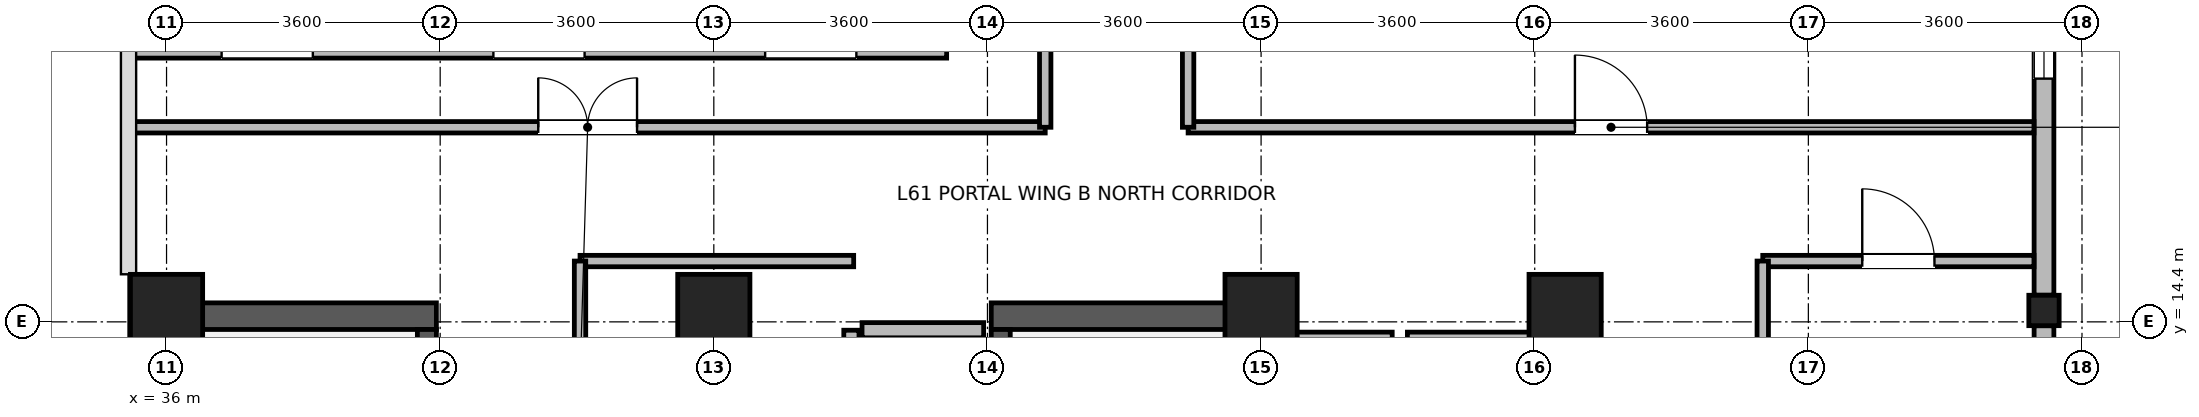
"""IFC4 building model, lengths in metres.
Left out: names, types, materials, properties, quantities, classifications, styles, units other than length and angle.
Written with IfcOpenShell. Run it as: python <this file> out.ifc"""

import sys

from ifc_helpers import new_model, si_unit, direction, frame, frame_2d, origin, origin_2d, place, context, subcontext, project, spatial, rectangle, i_section, extrude, source, transform, mapped, element, fill, save


model = new_model("IFC4")
c1 = context("Model", 3, precision=1e-05, world=origin(), true_north=direction((0.0, 1.0)))
c2 = subcontext(c1, "Body", "Model", "MODEL_VIEW")
j1 = project(units=[si_unit("LENGTHUNIT", "METRE"), si_unit("PLANEANGLEUNIT", "RADIAN")], contexts=[c1])
p1 = place(None, origin())
s1 = spatial("IfcSite", under=j1, at=p1, CompositionType="ELEMENT")
p2 = place(p1, origin())
s2 = spatial("IfcBuilding", under=s1, at=p2, CompositionType="ELEMENT")
p3 = place(p2, frame((0.0, 0.0, 238.8)))
s3 = spatial("IfcBuildingStorey", under=s2, at=p3, CompositionType="ELEMENT", Elevation=238.8)
for number, where, z_axis, x_axis in (
    (1, (36.175, 6.95, 0.0), (0.0, 0.0, 1.0), (0.0, 1.0, 0.0)),
    (2, (50.225, 6.95, 0.0), (0.0, 0.0, 1.0), (0.0, 1.0, 0.0)),
):
    element("IfcWall", number, at=place(p3, frame(where, z_axis=z_axis, x_axis=x_axis)), inside=s3, PredefinedType="SHEAR", context=c2, shape_type="SweptSolid", body=[
        extrude(rectangle(XDim=7.7, YDim=0.35, at=frame_2d((3.85, 0.0))), origin(), (0.0, 0.0, 1.0), 3.44),
    ])
for number, where, z_axis, x_axis in (
    (3, (36.35, 14.475, 0.0), (0.0, 0.0, 1.0), (1.0, 0.0, 0.0)),
    (4, (46.85, 14.475, 0.0), (0.0, 0.0, 1.0), (1.0, 0.0, 0.0)),
):
    element("IfcWall", number, at=place(p3, frame(where, z_axis=z_axis, x_axis=x_axis)), inside=s3, PredefinedType="SHEAR", context=c2, shape_type="SweptSolid", body=[
        extrude(rectangle(XDim=3.2, YDim=0.35, at=frame_2d((1.6, 0.0))), origin(), (0.0, 0.0, 1.0), 3.44),
    ])
p4 = place(p3, frame((39.425, 7.3, 0.0), z_axis=(0.0, 0.0, 1.0), x_axis=(0.0, 1.0, 0.0)))
e5 = element("IfcWall", 5, at=p4, inside=s3, PredefinedType="SHEAR", context=c2, shape_type="SweptSolid", body=[
    extrude(rectangle(XDim=7.0, YDim=0.25, at=frame_2d((3.5, 0.0))), origin(), (0.0, 0.0, 1.0), 3.44),
])
p5 = place(p4, frame((0.15, 0.0, 0.0)))
e6 = element("IfcOpeningElement", 6, at=p5, cuts=e5, PredefinedType="OPENING", context=c2, shape_type="SweptSolid", body=[
    extrude(rectangle(XDim=1.1, YDim=2.08, at=frame_2d((0.55, 1.04))), frame((0.0, 0.135, 0.0), z_axis=(0.0, -1.0, 0.0), x_axis=(1.0, 0.0, 0.0)), (0.0, 0.0, 1.0), 0.27),
])
p6 = place(p3, frame((46.975, 7.3, 0.0), z_axis=(0.0, 0.0, 1.0), x_axis=(0.0, 1.0, 0.0)))
e7 = element("IfcWall", 7, at=p6, inside=s3, PredefinedType="SHEAR", context=c2, shape_type="SweptSolid", body=[
    extrude(rectangle(XDim=7.0, YDim=0.25, at=frame_2d((3.5, 0.0))), origin(), (0.0, 0.0, 1.0), 3.44),
])
p7 = place(p6, frame((0.15, 0.0, 0.0)))
e8 = element("IfcOpeningElement", 8, at=p7, cuts=e7, PredefinedType="OPENING", context=c2, shape_type="SweptSolid", body=[
    extrude(rectangle(XDim=1.1, YDim=2.08, at=frame_2d((0.55, 1.04))), frame((0.0, 0.135, 0.0), z_axis=(0.0, -1.0, 0.0), x_axis=(1.0, 0.0, 0.0)), (0.0, 0.0, 1.0), 0.27),
])
m1 = source(origin(), c2, "Body", "SweptSolid", [
    extrude(rectangle(XDim=0.95, YDim=0.95, at=origin_2d()), origin(), (0.0, 0.0, 1.0), 3.7),
])
for number, where, z_axis, x_axis in (
    (9, (36.0, 14.55, 0.0), (0.0, 0.0, 1.0), (1.0, 0.0, 0.0)),
    (10, (43.2, 14.55, 0.0), (0.0, 0.0, 1.0), (1.0, 0.0, 0.0)),
    (11, (50.4, 14.55, 0.0), (0.0, 0.0, 1.0), (1.0, 0.0, 0.0)),
    (12, (54.4, 14.55, 0.0), (0.0, 0.0, 1.0), (1.0, 0.0, 0.0)),
):
    element("IfcColumn", number, at=place(p3, frame(where, z_axis=z_axis, x_axis=x_axis)), inside=s3, PredefinedType="COLUMN", context=c2, shape_type="MappedRepresentation", body=[
        mapped(m1, transform((0.0, 0.0, 0.0), x_axis=(1.0, 0.0, 0.0), y_axis=(0.0, 1.0, 0.0), z_axis=(0.0, 0.0, 1.0), scale=1.0)),
    ])
m2 = source(origin(), c2, "Body", "SweptSolid", [
    extrude(i_section(OverallWidth=0.399, OverallDepth=0.4, WebThickness=0.017, FlangeThickness=0.023, FilletRadius=0.015, at=origin_2d()), origin(), (0.0, 0.0, 1.0), 3.7),
])
p8 = place(p3, frame((60.7, 14.55, 0.0), z_axis=(0.0, 0.0, 1.0), x_axis=(1.0, 0.0, 0.0)))
e13 = element("IfcColumn", 13, at=p8, inside=s3, PredefinedType="COLUMN", context=c2, shape_type="MappedRepresentation", body=[
    mapped(m2, transform((0.0, 0.0, 0.0), x_axis=(1.0, 0.0, 0.0), y_axis=(0.0, 1.0, 0.0), z_axis=(0.0, 0.0, 1.0), scale=1.0)),
])
p9 = place(p3, frame((60.7, 14.349, 0.0), z_axis=(0.0, 0.0, 1.0), x_axis=(0.0, -1.0, 0.0)))
e14 = element("IfcWall", 14, at=p9, inside=s3, PredefinedType="STANDARD", context=c2, shape_type="SweptSolid", body=[
    extrude(rectangle(XDim=7.098, YDim=0.26, at=frame_2d((3.549, 0.0))), origin(), (0.0, 0.0, 1.0), 3.02),
])
p10 = place(p9, frame((1.175, 0.0, 0.85)))
e15 = element("IfcOpeningElement", 15, at=p10, cuts=e14, PredefinedType="OPENING", context=c2, shape_type="SweptSolid", body=[
    extrude(rectangle(XDim=1.2, YDim=1.75, at=frame_2d((0.6, 0.875))), frame((0.0, 0.14, 0.0), z_axis=(0.0, -1.0, 0.0), x_axis=(1.0, 0.0, 0.0)), (0.0, 0.0, 1.0), 0.28),
])
p11 = place(p9, frame((3.074, 0.0, 0.85)))
e16 = element("IfcOpeningElement", 16, at=p11, cuts=e14, PredefinedType="OPENING", context=c2, shape_type="SweptSolid", body=[
    extrude(rectangle(XDim=0.95, YDim=1.75, at=frame_2d((0.475, 0.875))), frame((0.0, 0.14, 0.0), z_axis=(0.0, -1.0, 0.0), x_axis=(1.0, 0.0, 0.0)), (0.0, 0.0, 1.0), 0.28),
])
p12 = place(p3, frame((60.7, 21.399, 0.0), z_axis=(0.0, 0.0, 1.0), x_axis=(0.0, -1.0, 0.0)))
e17 = element("IfcWall", 17, at=p12, inside=s3, PredefinedType="STANDARD", context=c2, shape_type="SweptSolid", body=[
    extrude(rectangle(XDim=6.648, YDim=0.26, at=frame_2d((3.324, 0.0))), origin(), (0.0, 0.0, 1.0), 3.02),
])
p13 = place(p12, frame((1.062, 0.0, 0.85)))
e18 = element("IfcOpeningElement", 18, at=p13, cuts=e17, PredefinedType="OPENING", context=c2, shape_type="SweptSolid", body=[
    extrude(rectangle(XDim=1.2, YDim=1.75, at=frame_2d((0.6, 0.875))), frame((0.0, 0.14, 0.0), z_axis=(0.0, -1.0, 0.0), x_axis=(1.0, 0.0, 0.0)), (0.0, 0.0, 1.0), 0.28),
])
p14 = place(p12, frame((2.849, 0.0, 0.85)))
e19 = element("IfcOpeningElement", 19, at=p14, cuts=e17, PredefinedType="OPENING", context=c2, shape_type="SweptSolid", body=[
    extrude(rectangle(XDim=0.95, YDim=1.75, at=frame_2d((0.475, 0.875))), frame((0.0, 0.14, 0.0), z_axis=(0.0, -1.0, 0.0), x_axis=(1.0, 0.0, 0.0)), (0.0, 0.0, 1.0), 0.28),
])
p15 = place(p3, frame((35.537, 18.0, 0.0), z_axis=(0.0, 0.0, 1.0), x_axis=(1.0, 0.0, 0.0)))
e20 = element("IfcWall", 20, at=p15, inside=s3, PredefinedType="STANDARD", context=c2, shape_type="SweptSolid", body=[
    extrude(rectangle(XDim=10.726, YDim=0.26, at=frame_2d((5.363, 0.0))), origin(), (0.0, 0.0, 1.0), 3.42),
])
p16 = place(p15, frame((1.188, 0.0, 0.85)))
e21 = element("IfcOpeningElement", 21, at=p16, cuts=e20, PredefinedType="OPENING", context=c2, shape_type="SweptSolid", body=[
    extrude(rectangle(XDim=1.2, YDim=1.75, at=frame_2d((0.6, 0.875))), frame((0.0, 0.14, 0.0), z_axis=(0.0, -1.0, 0.0), x_axis=(1.0, 0.0, 0.0)), (0.0, 0.0, 1.0), 0.28),
])
p17 = place(p15, frame((4.763, 0.0, 0.85)))
e22 = element("IfcOpeningElement", 22, at=p17, cuts=e20, PredefinedType="OPENING", context=c2, shape_type="SweptSolid", body=[
    extrude(rectangle(XDim=1.2, YDim=1.75, at=frame_2d((0.6, 0.875))), frame((0.0, 0.14, 0.0), z_axis=(0.0, -1.0, 0.0), x_axis=(1.0, 0.0, 0.0)), (0.0, 0.0, 1.0), 0.28),
])
p18 = place(p15, frame((8.338, 0.0, 0.85)))
e23 = element("IfcOpeningElement", 23, at=p18, cuts=e20, PredefinedType="OPENING", context=c2, shape_type="SweptSolid", body=[
    extrude(rectangle(XDim=1.2, YDim=1.75, at=frame_2d((0.6, 0.875))), frame((0.0, 0.14, 0.0), z_axis=(0.0, -1.0, 0.0), x_axis=(1.0, 0.0, 0.0)), (0.0, 0.0, 1.0), 0.28),
])
p19 = place(p3, frame((50.475, 14.165, 0.0), z_axis=(0.0, 0.0, 1.0), x_axis=(1.0, 0.0, 0.0)))
e24 = element("IfcWall", 24, at=p19, inside=s3, PredefinedType="PARTITIONING", context=c2, shape_type="SweptSolid", body=[
    extrude(rectangle(XDim=1.65, YDim=0.2, at=frame_2d((0.825, 0.0))), origin(), (0.0, 0.0, 1.0), 3.42),
])
p20 = place(p3, frame((52.325, 14.165, 0.0), z_axis=(0.0, 0.0, 1.0), x_axis=(1.0, 0.0, 0.0)))
e25 = element("IfcWall", 25, at=p20, inside=s3, PredefinedType="PARTITIONING", context=c2, shape_type="SweptSolid", body=[
    extrude(rectangle(XDim=1.65, YDim=0.2, at=frame_2d((0.825, 0.0))), origin(), (0.0, 0.0, 1.0), 3.42),
])
p21 = place(p3, frame((45.15, 14.29, 0.0), z_axis=(0.0, 0.0, 1.0), x_axis=(1.0, 0.0, 0.0)))
e26 = element("IfcWall", 26, at=p21, inside=s3, PredefinedType="PARTITIONING", context=c2, shape_type="SweptSolid", body=[
    extrude(rectangle(XDim=1.6, YDim=0.2, at=frame_2d((0.8, 0.0))), origin(), (0.0, 0.0, 1.0), 2.52),
])
p22 = place(p3, frame((45.01, 11.61, 0.0), z_axis=(0.0, 0.0, 1.0), x_axis=(0.0, 1.0, 0.0)))
e27 = element("IfcWall", 27, at=p22, inside=s3, PredefinedType="PARTITIONING", context=c2, shape_type="SweptSolid", body=[
    extrude(rectangle(XDim=2.68, YDim=0.2, at=frame_2d((1.34, 0.0))), origin(), (0.0, 0.0, 1.0), 3.42),
])
p23 = place(p3, frame((35.52, 16.96, 0.0), z_axis=(0.0, 0.0, 1.0), x_axis=(1.0, 0.0, 0.0)))
e28 = element("IfcWall", 28, at=p23, inside=s3, PredefinedType="PARTITIONING", context=c2, shape_type="SweptSolid", body=[
    extrude(rectangle(XDim=12.04, YDim=0.15, at=frame_2d((6.02, 0.0))), origin(), (0.0, 0.0, 1.0), 3.42),
])
p24 = place(p23, frame((5.37, 0.0, 0.0)))
e29 = element("IfcOpeningElement", 29, at=p24, cuts=e28, PredefinedType="OPENING", context=c2, shape_type="SweptSolid", body=[
    extrude(rectangle(XDim=1.3, YDim=2.12, at=frame_2d((0.65, 1.06))), frame((0.0, 0.085, 0.0), z_axis=(0.0, -1.0, 0.0), x_axis=(1.0, 0.0, 0.0)), (0.0, 0.0, 1.0), 0.17),
])
p25 = place(p3, frame((49.44, 16.96, 0.0), z_axis=(0.0, 0.0, 1.0), x_axis=(1.0, 0.0, 0.0)))
e30 = element("IfcWall", 30, at=p25, inside=s3, PredefinedType="PARTITIONING", context=c2, shape_type="SweptSolid", body=[
    extrude(rectangle(XDim=11.128, YDim=0.15, at=frame_2d((5.564, 0.0))), origin(), (0.0, 0.0, 1.0), 3.42),
])
p26 = place(p25, frame((5.089, 0.0, 0.0)))
e31 = element("IfcOpeningElement", 31, at=p26, cuts=e30, PredefinedType="OPENING", context=c2, shape_type="SweptSolid", body=[
    extrude(rectangle(XDim=0.95, YDim=2.1, at=frame_2d((0.475, 1.05))), frame((0.0, 0.085, 0.0), z_axis=(0.0, -1.0, 0.0), x_axis=(1.0, 0.0, 0.0)), (0.0, 0.0, 1.0), 0.17),
])
p27 = place(p3, frame((49.44, 16.96, 0.0), z_axis=(0.0, 0.0, 1.0), x_axis=(0.0, 1.0, 0.0)))
e32 = element("IfcWall", 32, at=p27, inside=s3, PredefinedType="PARTITIONING", context=c2, shape_type="SweptSolid", body=[
    extrude(rectangle(XDim=5.24, YDim=0.15, at=frame_2d((2.62, 0.0))), origin(), (0.0, 0.0, 1.0), 3.42),
])
p28 = place(p3, frame((47.56, 16.96, 0.0), z_axis=(0.0, 0.0, 1.0), x_axis=(0.0, 1.0, 0.0)))
e33 = element("IfcWall", 33, at=p28, inside=s3, PredefinedType="PARTITIONING", context=c2, shape_type="SweptSolid", body=[
    extrude(rectangle(XDim=4.44, YDim=0.15, at=frame_2d((2.22, 0.0))), origin(), (0.0, 0.0, 1.0), 3.42),
])
p29 = place(p3, frame((57.0, 15.2, 0.0), z_axis=(0.0, 0.0, 1.0), x_axis=(1.0, 0.0, 0.0)))
e34 = element("IfcWall", 34, at=p29, inside=s3, PredefinedType="PARTITIONING", context=c2, shape_type="SweptSolid", body=[
    extrude(rectangle(XDim=3.568, YDim=0.15, at=frame_2d((1.784, 0.0))), origin(), (0.0, 0.0, 1.0), 3.42),
])
p30 = place(p29, frame((1.309, 0.0, 0.0)))
e35 = element("IfcOpeningElement", 35, at=p30, cuts=e34, PredefinedType="OPENING", context=c2, shape_type="SweptSolid", body=[
    extrude(rectangle(XDim=0.95, YDim=2.1, at=frame_2d((0.475, 1.05))), frame((0.0, 0.085, 0.0), z_axis=(0.0, -1.0, 0.0), x_axis=(1.0, 0.0, 0.0)), (0.0, 0.0, 1.0), 0.17),
])
p31 = place(p3, frame((41.44, 15.2, 0.0), z_axis=(0.0, 0.0, 1.0), x_axis=(1.0, 0.0, 0.0)))
e36 = element("IfcWall", 36, at=p31, inside=s3, PredefinedType="PARTITIONING", context=c2, shape_type="SweptSolid", body=[
    extrude(rectangle(XDim=3.6, YDim=0.15, at=frame_2d((1.8, 0.0))), origin(), (0.0, 0.0, 1.0), 3.42),
])
p32 = place(p3, frame((41.44, 11.64, 0.0), z_axis=(0.0, 0.0, 1.0), x_axis=(0.0, 1.0, 0.0)))
e37 = element("IfcWall", 37, at=p32, inside=s3, PredefinedType="PARTITIONING", context=c2, shape_type="SweptSolid", body=[
    extrude(rectangle(XDim=3.56, YDim=0.15, at=frame_2d((1.78, 0.0))), origin(), (0.0, 0.0, 1.0), 3.42),
])
p33 = place(p3, frame((57.0, 11.96, 0.0), z_axis=(0.0, 0.0, 1.0), x_axis=(0.0, 1.0, 0.0)))
e38 = element("IfcWall", 38, at=p33, inside=s3, PredefinedType="PARTITIONING", context=c2, shape_type="SweptSolid", body=[
    extrude(rectangle(XDim=3.24, YDim=0.15, at=frame_2d((1.62, 0.0))), origin(), (0.0, 0.0, 1.0), 3.42),
])
p34 = place(p14, origin())
e39 = element("IfcWindow", 39, at=p34, inside=s3, PartitioningType="SINGLE_PANEL", PredefinedType="WINDOW", context=c2, shape_type="SweptSolid", body=[
    extrude(rectangle(XDim=0.95, YDim=1.75, at=frame_2d((0.475, 0.875))), frame((0.0, 0.03, 0.0), z_axis=(0.0, -1.0, 0.0), x_axis=(1.0, 0.0, 0.0)), (0.0, 0.0, 1.0), 0.06),
])
fill(e19, e39)
p35 = place(p24, origin())
e40 = element("IfcDoor", 40, at=p35, inside=s3, OperationType="DOUBLE_DOOR_SINGLE_SWING", PredefinedType="DOOR", context=c2, shape_type="SweptSolid", body=[
    extrude(rectangle(XDim=1.3, YDim=2.12, at=frame_2d((0.65, 1.06))), frame((0.0, 0.025, 0.0), z_axis=(0.0, -1.0, 0.0), x_axis=(1.0, 0.0, 0.0)), (0.0, 0.0, 1.0), 0.05),
])
fill(e29, e40)
p36 = place(p26, origin())
e41 = element("IfcDoor", 41, at=p36, inside=s3, OperationType="SINGLE_SWING_LEFT", PredefinedType="DOOR", context=c2, shape_type="SweptSolid", body=[
    extrude(rectangle(XDim=0.95, YDim=2.1, at=frame_2d((0.475, 1.05))), frame((0.0, 0.025, 0.0), z_axis=(0.0, -1.0, 0.0), x_axis=(1.0, 0.0, 0.0)), (0.0, 0.0, 1.0), 0.05),
])
fill(e31, e41)
p37 = place(p30, origin())
e42 = element("IfcDoor", 42, at=p37, inside=s3, OperationType="SINGLE_SWING_LEFT", PredefinedType="DOOR", context=c2, shape_type="SweptSolid", body=[
    extrude(rectangle(XDim=0.95, YDim=2.1, at=frame_2d((0.475, 1.05))), frame((0.0, 0.025, 0.0), z_axis=(0.0, -1.0, 0.0), x_axis=(1.0, 0.0, 0.0)), (0.0, 0.0, 1.0), 0.05),
])
fill(e35, e42)
save(model, sys.argv[1])
